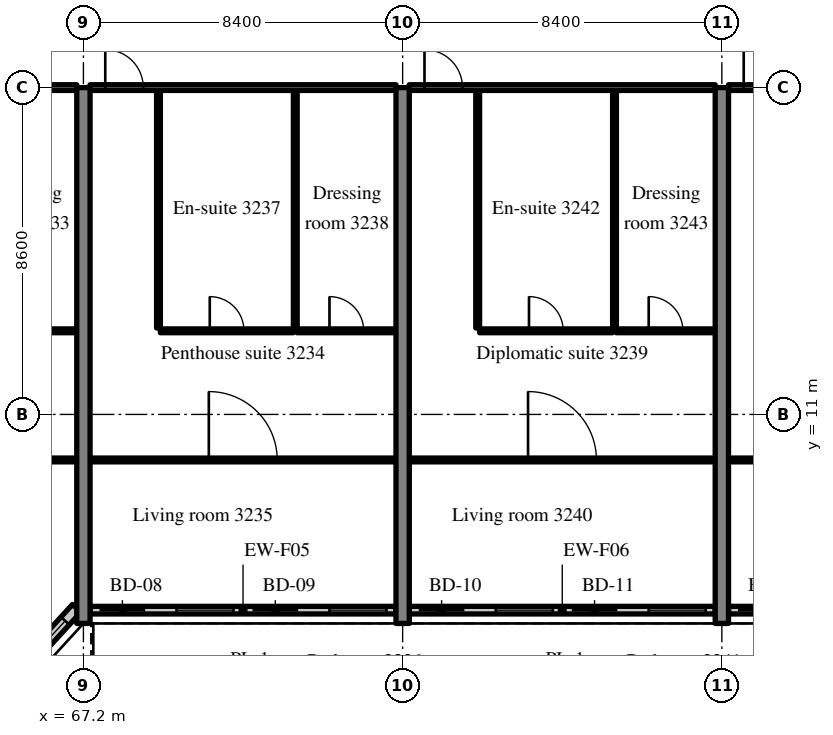
"""IFC4 building model, lengths in metres.
Left out: names, types, materials, properties, quantities, classifications, styles, units other than length and angle.
Written with IfcOpenShell. Run it as: python <this file> out.ifc"""

import sys

from ifc_helpers import new_model, si_unit, direction, frame, frame_2d, origin, place, context, subcontext, project, spatial, rectangle, extrude, source, transform, mapped, element, fill, save


model = new_model("IFC4")
c1 = context("Model", 3, precision=1e-05, world=origin(), true_north=direction((0.0, 1.0)))
c2 = subcontext(c1, "Body", "Model", "MODEL_VIEW")
j1 = project(units=[si_unit("LENGTHUNIT", "METRE"), si_unit("PLANEANGLEUNIT", "RADIAN")], contexts=[c1])
p1 = place(None, origin())
s1 = spatial("IfcSite", under=j1, at=p1, CompositionType="ELEMENT")
p2 = place(p1, origin())
s2 = spatial("IfcBuilding", under=s1, at=p2, CompositionType="ELEMENT")
p3 = place(p2, frame((0.0, 0.0, 133.2)))
s3 = spatial("IfcBuildingStorey", under=s2, at=p3, CompositionType="ELEMENT", Elevation=133.2)
m1 = source(origin(), c2, "Body", "SweptSolid", [
    extrude(rectangle(XDim=14.1, YDim=0.35, at=frame_2d((7.05, 0.0))), origin(), (0.0, 0.0, 1.0), 3.52),
])
for number, where, z_axis, x_axis in (
    (1, (67.2, 5.5, 0.0), (0.0, 0.0, 1.0), (0.0, 1.0, 0.0)),
    (2, (75.6, 5.5, 0.0), (0.0, 0.0, 1.0), (0.0, 1.0, 0.0)),
    (3, (84.0, 5.5, 0.0), (0.0, 0.0, 1.0), (0.0, 1.0, 0.0)),
):
    element("IfcWall", number, at=place(p3, frame(where, z_axis=z_axis, x_axis=x_axis)), inside=s3, PredefinedType="SHEAR", context=c2, shape_type="MappedRepresentation", body=[
        mapped(m1, transform((0.0, 0.0, 0.0), scale=1.0)),
    ])
m2 = source(origin(), c2, "Body", "SweptSolid", [
    extrude(rectangle(XDim=2.398, YDim=0.3, at=frame_2d((1.199, 0.0))), origin(), (0.0, 0.0, 1.0), 3.52),
])
p4 = place(p3, frame((65.404, 4.131, 0.0), z_axis=(0.0, 0.0, 1.0), x_axis=(0.675374189419, 0.737475222815, 0.0)))
e4 = element("IfcWall", 4, at=p4, inside=s3, PredefinedType="SOLIDWALL", context=c2, shape_type="MappedRepresentation", body=[
    mapped(m2, transform((0.0, 0.0, 0.0), scale=1.0)),
])
m3 = source(origin(), c2, "Body", "SweptSolid", [
    extrude(rectangle(XDim=1.5, YDim=2.0, at=frame_2d((0.75, 1.0))), frame((0.0, 0.16, 0.0), z_axis=(0.0, -1.0, 0.0), x_axis=(1.0, 0.0, 0.0)), (0.0, 0.0, 1.0), 0.32),
])
p5 = place(p4, frame((0.449, 0.0, 0.9)))
e5 = element("IfcOpeningElement", 5, at=p5, cuts=e4, PredefinedType="OPENING", context=c2, shape_type="MappedRepresentation", body=[
    mapped(m3, transform((0.0, 0.0, 0.0), scale=1.0)),
])
m4 = source(origin(), c2, "Body", "SweptSolid", [
    extrude(rectangle(XDim=8.05, YDim=0.2, at=frame_2d((4.025, 0.0))), origin(), (0.0, 0.0, 1.0), 2.82),
])
p6 = place(p3, frame((67.375, 5.85, 0.0), z_axis=(0.0, 0.0, 1.0), x_axis=(1.0, 0.0, 0.0)))
e6 = element("IfcWall", 6, at=p6, inside=s3, PredefinedType="SOLIDWALL", context=c2, shape_type="MappedRepresentation", body=[
    mapped(m4, transform((0.0, 0.0, 0.0), scale=1.0)),
])
m5 = source(origin(), c2, "Body", "SweptSolid", [
    extrude(rectangle(XDim=1.2, YDim=2.4, at=frame_2d((0.6, 1.2))), frame((0.0, 0.11, 0.0), z_axis=(0.0, -1.0, 0.0), x_axis=(1.0, 0.0, 0.0)), (0.0, 0.0, 1.0), 0.22),
])
p7 = place(p6, frame((0.25, 0.0, 0.0)))
e7 = element("IfcOpeningElement", 7, at=p7, cuts=e6, PredefinedType="OPENING", context=c2, shape_type="MappedRepresentation", body=[
    mapped(m5, transform((0.0, 0.0, 0.0), scale=1.0)),
])
m6 = source(origin(), c2, "Body", "SweptSolid", [
    extrude(rectangle(XDim=1.5, YDim=1.5, at=frame_2d((0.75, 0.75))), frame((0.0, 0.11, 0.0), z_axis=(0.0, -1.0, 0.0), x_axis=(1.0, 0.0, 0.0)), (0.0, 0.0, 1.0), 0.22),
])
p8 = place(p6, frame((2.275, 0.0, 0.9)))
e8 = element("IfcOpeningElement", 8, at=p8, cuts=e6, PredefinedType="OPENING", context=c2, shape_type="MappedRepresentation", body=[
    mapped(m6, transform((0.0, 0.0, 0.0), scale=1.0)),
])
p9 = place(p6, frame((4.275, 0.0, 0.0)))
e9 = element("IfcOpeningElement", 9, at=p9, cuts=e6, PredefinedType="OPENING", context=c2, shape_type="MappedRepresentation", body=[
    mapped(m5, transform((0.0, 0.0, 0.0), scale=1.0)),
])
p10 = place(p6, frame((6.3, 0.0, 0.9)))
e10 = element("IfcOpeningElement", 10, at=p10, cuts=e6, PredefinedType="OPENING", context=c2, shape_type="MappedRepresentation", body=[
    mapped(m6, transform((0.0, 0.0, 0.0), scale=1.0)),
])
p11 = place(p3, frame((75.775, 5.85, 0.0), z_axis=(0.0, 0.0, 1.0), x_axis=(1.0, 0.0, 0.0)))
e11 = element("IfcWall", 11, at=p11, inside=s3, PredefinedType="SOLIDWALL", context=c2, shape_type="MappedRepresentation", body=[
    mapped(m4, transform((0.0, 0.0, 0.0), scale=1.0)),
])
p12 = place(p11, frame((0.25, 0.0, 0.0)))
e12 = element("IfcOpeningElement", 12, at=p12, cuts=e11, PredefinedType="OPENING", context=c2, shape_type="MappedRepresentation", body=[
    mapped(m5, transform((0.0, 0.0, 0.0), scale=1.0)),
])
p13 = place(p11, frame((2.275, 0.0, 0.9)))
e13 = element("IfcOpeningElement", 13, at=p13, cuts=e11, PredefinedType="OPENING", context=c2, shape_type="MappedRepresentation", body=[
    mapped(m6, transform((0.0, 0.0, 0.0), scale=1.0)),
])
p14 = place(p11, frame((4.275, 0.0, 0.0)))
e14 = element("IfcOpeningElement", 14, at=p14, cuts=e11, PredefinedType="OPENING", context=c2, shape_type="MappedRepresentation", body=[
    mapped(m5, transform((0.0, 0.0, 0.0), scale=1.0)),
])
p15 = place(p11, frame((6.3, 0.0, 0.9)))
e15 = element("IfcOpeningElement", 15, at=p15, cuts=e11, PredefinedType="OPENING", context=c2, shape_type="MappedRepresentation", body=[
    mapped(m6, transform((0.0, 0.0, 0.0), scale=1.0)),
])
p16 = place(p3, frame((84.175, 5.85, 0.0), z_axis=(0.0, 0.0, 1.0), x_axis=(1.0, 0.0, 0.0)))
e16 = element("IfcWall", 16, at=p16, inside=s3, PredefinedType="SOLIDWALL", context=c2, shape_type="MappedRepresentation", body=[
    mapped(m4, transform((0.0, 0.0, 0.0), scale=1.0)),
])
p17 = place(p16, frame((0.25, 0.0, 0.0)))
e17 = element("IfcOpeningElement", 17, at=p17, cuts=e16, PredefinedType="OPENING", context=c2, shape_type="MappedRepresentation", body=[
    mapped(m5, transform((0.0, 0.0, 0.0), scale=1.0)),
])
p18 = place(p16, frame((2.275, 0.0, 0.9)))
e18 = element("IfcOpeningElement", 18, at=p18, cuts=e16, PredefinedType="OPENING", context=c2, shape_type="MappedRepresentation", body=[
    mapped(m6, transform((0.0, 0.0, 0.0), scale=1.0)),
])
p19 = place(p16, frame((4.275, 0.0, 0.0)))
e19 = element("IfcOpeningElement", 19, at=p19, cuts=e16, PredefinedType="OPENING", context=c2, shape_type="MappedRepresentation", body=[
    mapped(m5, transform((0.0, 0.0, 0.0), scale=1.0)),
])
p20 = place(p16, frame((6.3, 0.0, 0.9)))
e20 = element("IfcOpeningElement", 20, at=p20, cuts=e16, PredefinedType="OPENING", context=c2, shape_type="MappedRepresentation", body=[
    mapped(m6, transform((0.0, 0.0, 0.0), scale=1.0)),
])
m7 = source(origin(), c2, "Body", "SweptSolid", [
    extrude(rectangle(XDim=2.6, YDim=0.1, at=frame_2d((1.3, 0.0))), origin(), (0.0, 0.0, 1.0), 3.52),
])
p21 = place(p3, frame((64.425, 13.2, 0.0), z_axis=(0.0, 0.0, 1.0), x_axis=(1.0, 0.0, 0.0)))
e21 = element("IfcWall", 21, at=p21, inside=s3, PredefinedType="PARTITIONING", context=c2, shape_type="MappedRepresentation", body=[
    mapped(m7, transform((0.0, 0.0, 0.0), scale=1.0)),
])
m8 = source(origin(), c2, "Body", "SweptSolid", [
    extrude(rectangle(XDim=0.9, YDim=2.1, at=frame_2d((0.45, 1.05))), frame((0.0, 0.06, 0.0), z_axis=(0.0, -1.0, 0.0), x_axis=(1.0, 0.0, 0.0)), (0.0, 0.0, 1.0), 0.12),
])
p22 = place(p21, frame((0.85, 0.0, 0.0)))
e22 = element("IfcOpeningElement", 22, at=p22, cuts=e21, PredefinedType="OPENING", context=c2, shape_type="MappedRepresentation", body=[
    mapped(m8, transform((0.0, 0.0, 0.0), scale=1.0)),
])
m9 = source(origin(), c2, "Body", "SweptSolid", [
    extrude(rectangle(XDim=8.05, YDim=0.1, at=frame_2d((4.025, 0.0))), origin(), (0.0, 0.0, 1.0), 3.52),
])
p23 = place(p3, frame((58.975, 9.802, 0.0), z_axis=(0.0, 0.0, 1.0), x_axis=(1.0, 0.0, 0.0)))
e23 = element("IfcWall", 23, at=p23, inside=s3, PredefinedType="PARTITIONING", context=c2, shape_type="MappedRepresentation", body=[
    mapped(m9, transform((0.0, 0.0, 0.0), scale=1.0)),
])
m10 = source(origin(), c2, "Body", "SweptSolid", [
    extrude(rectangle(XDim=1.8, YDim=2.1, at=frame_2d((0.9, 1.05))), frame((0.0, 0.06, 0.0), z_axis=(0.0, -1.0, 0.0), x_axis=(1.0, 0.0, 0.0)), (0.0, 0.0, 1.0), 0.12),
])
p24 = place(p23, frame((3.125, 0.0, 0.0)))
e24 = element("IfcOpeningElement", 24, at=p24, cuts=e23, PredefinedType="OPENING", context=c2, shape_type="MappedRepresentation", body=[
    mapped(m10, transform((0.0, 0.0, 0.0), scale=1.0)),
])
m11 = source(origin(), c2, "Body", "SweptSolid", [
    extrude(rectangle(XDim=8.05, YDim=0.15, at=frame_2d((4.025, 0.0))), origin(), (0.0, 0.0, 1.0), 2.82),
])
p25 = place(p3, frame((58.975, 19.6, 0.0), z_axis=(0.0, 0.0, 1.0), x_axis=(1.0, 0.0, 0.0)))
e25 = element("IfcWall", 25, at=p25, inside=s3, PredefinedType="PARTITIONING", context=c2, shape_type="MappedRepresentation", body=[
    mapped(m11, transform((0.0, 0.0, 0.0), scale=1.0)),
])
m12 = source(origin(), c2, "Body", "SweptSolid", [
    extrude(rectangle(XDim=1.0, YDim=2.1, at=frame_2d((0.5, 1.05))), frame((0.0, 0.085, 0.0), z_axis=(0.0, -1.0, 0.0), x_axis=(1.0, 0.0, 0.0)), (0.0, 0.0, 1.0), 0.17),
])
p26 = place(p25, frame((0.4, 0.0, 0.0)))
e26 = element("IfcOpeningElement", 26, at=p26, cuts=e25, PredefinedType="OPENING", context=c2, shape_type="MappedRepresentation", body=[
    mapped(m12, transform((0.0, 0.0, 0.0), scale=1.0)),
])
m13 = source(origin(), c2, "Body", "SweptSolid", [
    extrude(rectangle(XDim=6.25, YDim=0.1, at=frame_2d((3.125, 0.0))), origin(), (0.0, 0.0, 1.0), 3.52),
])
for number, where, z_axis, x_axis in (
    (27, (69.175, 13.275, 0.0), (0.0, 0.0, 1.0), (0.0, 1.0, 0.0)),
    (28, (72.775, 13.275, 0.0), (0.0, 0.0, 1.0), (0.0, 1.0, 0.0)),
):
    element("IfcWall", number, at=place(p3, frame(where, z_axis=z_axis, x_axis=x_axis)), inside=s3, PredefinedType="PARTITIONING", context=c2, shape_type="MappedRepresentation", body=[
        mapped(m13, transform((0.0, 0.0, 0.0), scale=1.0)),
    ])
m14 = source(origin(), c2, "Body", "SweptSolid", [
    extrude(rectangle(XDim=3.5, YDim=0.1, at=frame_2d((1.75, 0.0))), origin(), (0.0, 0.0, 1.0), 3.52),
])
p27 = place(p3, frame((69.225, 13.2, 0.0), z_axis=(0.0, 0.0, 1.0), x_axis=(1.0, 0.0, 0.0)))
e29 = element("IfcWall", 29, at=p27, inside=s3, PredefinedType="PARTITIONING", context=c2, shape_type="MappedRepresentation", body=[
    mapped(m14, transform((0.0, 0.0, 0.0), scale=1.0)),
])
p28 = place(p27, frame((1.3, 0.0, 0.0)))
e30 = element("IfcOpeningElement", 30, at=p28, cuts=e29, PredefinedType="OPENING", context=c2, shape_type="MappedRepresentation", body=[
    mapped(m8, transform((0.0, 0.0, 0.0), scale=1.0)),
])
m15 = source(origin(), c2, "Body", "SweptSolid", [
    extrude(rectangle(XDim=2.6, YDim=0.1, at=frame_2d((1.3, 0.0))), origin(), (0.0, 0.0, 1.0), 3.52),
])
p29 = place(p3, frame((72.825, 13.2, 0.0), z_axis=(0.0, 0.0, 1.0), x_axis=(1.0, 0.0, 0.0)))
e31 = element("IfcWall", 31, at=p29, inside=s3, PredefinedType="PARTITIONING", context=c2, shape_type="MappedRepresentation", body=[
    mapped(m15, transform((0.0, 0.0, 0.0), scale=1.0)),
])
p30 = place(p29, frame((0.85, 0.0, 0.0)))
e32 = element("IfcOpeningElement", 32, at=p30, cuts=e31, PredefinedType="OPENING", context=c2, shape_type="MappedRepresentation", body=[
    mapped(m8, transform((0.0, 0.0, 0.0), scale=1.0)),
])
m16 = source(origin(), c2, "Body", "SweptSolid", [
    extrude(rectangle(XDim=8.05, YDim=0.1, at=frame_2d((4.025, 0.0))), origin(), (0.0, 0.0, 1.0), 3.52),
])
p31 = place(p3, frame((67.375, 9.802, 0.0), z_axis=(0.0, 0.0, 1.0), x_axis=(1.0, 0.0, 0.0)))
e33 = element("IfcWall", 33, at=p31, inside=s3, PredefinedType="PARTITIONING", context=c2, shape_type="MappedRepresentation", body=[
    mapped(m16, transform((0.0, 0.0, 0.0), scale=1.0)),
])
p32 = place(p31, frame((3.125, 0.0, 0.0)))
e34 = element("IfcOpeningElement", 34, at=p32, cuts=e33, PredefinedType="OPENING", context=c2, shape_type="MappedRepresentation", body=[
    mapped(m10, transform((0.0, 0.0, 0.0), scale=1.0)),
])
m17 = source(origin(), c2, "Body", "SweptSolid", [
    extrude(rectangle(XDim=8.05, YDim=0.15, at=frame_2d((4.025, 0.0))), origin(), (0.0, 0.0, 1.0), 2.82),
])
p33 = place(p3, frame((67.375, 19.6, 0.0), z_axis=(0.0, 0.0, 1.0), x_axis=(1.0, 0.0, 0.0)))
e35 = element("IfcWall", 35, at=p33, inside=s3, PredefinedType="PARTITIONING", context=c2, shape_type="MappedRepresentation", body=[
    mapped(m17, transform((0.0, 0.0, 0.0), scale=1.0)),
])
p34 = place(p33, frame((0.4, 0.0, 0.0)))
e36 = element("IfcOpeningElement", 36, at=p34, cuts=e35, PredefinedType="OPENING", context=c2, shape_type="MappedRepresentation", body=[
    mapped(m12, transform((0.0, 0.0, 0.0), scale=1.0)),
])
for number, where, z_axis, x_axis in (
    (37, (77.575, 13.275, 0.0), (0.0, 0.0, 1.0), (0.0, 1.0, 0.0)),
    (38, (81.175, 13.275, 0.0), (0.0, 0.0, 1.0), (0.0, 1.0, 0.0)),
):
    element("IfcWall", number, at=place(p3, frame(where, z_axis=z_axis, x_axis=x_axis)), inside=s3, PredefinedType="PARTITIONING", context=c2, shape_type="MappedRepresentation", body=[
        mapped(m13, transform((0.0, 0.0, 0.0), scale=1.0)),
    ])
p35 = place(p3, frame((77.625, 13.2, 0.0), z_axis=(0.0, 0.0, 1.0), x_axis=(1.0, 0.0, 0.0)))
e39 = element("IfcWall", 39, at=p35, inside=s3, PredefinedType="PARTITIONING", context=c2, shape_type="MappedRepresentation", body=[
    mapped(m14, transform((0.0, 0.0, 0.0), scale=1.0)),
])
p36 = place(p35, frame((1.3, 0.0, 0.0)))
e40 = element("IfcOpeningElement", 40, at=p36, cuts=e39, PredefinedType="OPENING", context=c2, shape_type="MappedRepresentation", body=[
    mapped(m8, transform((0.0, 0.0, 0.0), scale=1.0)),
])
p37 = place(p3, frame((81.225, 13.2, 0.0), z_axis=(0.0, 0.0, 1.0), x_axis=(1.0, 0.0, 0.0)))
e41 = element("IfcWall", 41, at=p37, inside=s3, PredefinedType="PARTITIONING", context=c2, shape_type="MappedRepresentation", body=[
    mapped(m7, transform((0.0, 0.0, 0.0), scale=1.0)),
])
p38 = place(p37, frame((0.85, 0.0, 0.0)))
e42 = element("IfcOpeningElement", 42, at=p38, cuts=e41, PredefinedType="OPENING", context=c2, shape_type="MappedRepresentation", body=[
    mapped(m8, transform((0.0, 0.0, 0.0), scale=1.0)),
])
p39 = place(p3, frame((75.775, 9.802, 0.0), z_axis=(0.0, 0.0, 1.0), x_axis=(1.0, 0.0, 0.0)))
e43 = element("IfcWall", 43, at=p39, inside=s3, PredefinedType="PARTITIONING", context=c2, shape_type="MappedRepresentation", body=[
    mapped(m16, transform((0.0, 0.0, 0.0), scale=1.0)),
])
p40 = place(p39, frame((3.125, 0.0, 0.0)))
e44 = element("IfcOpeningElement", 44, at=p40, cuts=e43, PredefinedType="OPENING", context=c2, shape_type="MappedRepresentation", body=[
    mapped(m10, transform((0.0, 0.0, 0.0), scale=1.0)),
])
p41 = place(p3, frame((75.775, 19.6, 0.0), z_axis=(0.0, 0.0, 1.0), x_axis=(1.0, 0.0, 0.0)))
e45 = element("IfcWall", 45, at=p41, inside=s3, PredefinedType="PARTITIONING", context=c2, shape_type="MappedRepresentation", body=[
    mapped(m17, transform((0.0, 0.0, 0.0), scale=1.0)),
])
p42 = place(p41, frame((0.4, 0.0, 0.0)))
e46 = element("IfcOpeningElement", 46, at=p42, cuts=e45, PredefinedType="OPENING", context=c2, shape_type="MappedRepresentation", body=[
    mapped(m12, transform((0.0, 0.0, 0.0), scale=1.0)),
])
p43 = place(p3, frame((84.175, 9.802, 0.0), z_axis=(0.0, 0.0, 1.0), x_axis=(1.0, 0.0, 0.0)))
e47 = element("IfcWall", 47, at=p43, inside=s3, PredefinedType="PARTITIONING", context=c2, shape_type="MappedRepresentation", body=[
    mapped(m16, transform((0.0, 0.0, 0.0), scale=1.0)),
])
p44 = place(p43, frame((3.125, 0.0, 0.0)))
e48 = element("IfcOpeningElement", 48, at=p44, cuts=e47, PredefinedType="OPENING", context=c2, shape_type="MappedRepresentation", body=[
    mapped(m10, transform((0.0, 0.0, 0.0), scale=1.0)),
])
p45 = place(p3, frame((84.175, 19.6, 0.0), z_axis=(0.0, 0.0, 1.0), x_axis=(1.0, 0.0, 0.0)))
e49 = element("IfcWall", 49, at=p45, inside=s3, PredefinedType="PARTITIONING", context=c2, shape_type="MappedRepresentation", body=[
    mapped(m17, transform((0.0, 0.0, 0.0), scale=1.0)),
])
p46 = place(p45, frame((0.4, 0.0, 0.0)))
e50 = element("IfcOpeningElement", 50, at=p46, cuts=e49, PredefinedType="OPENING", context=c2, shape_type="MappedRepresentation", body=[
    mapped(m12, transform((0.0, 0.0, 0.0), scale=1.0)),
])
m18 = source(origin(), c2, "Body", "SweptSolid", [
    extrude(rectangle(XDim=1.5, YDim=2.0, at=frame_2d((0.75, 1.0))), frame((0.0, 0.03, 0.0), z_axis=(0.0, -1.0, 0.0), x_axis=(1.0, 0.0, 0.0)), (0.0, 0.0, 1.0), 0.06),
])
p47 = place(p5, origin())
e51 = element("IfcWindow", 51, at=p47, inside=s3, PartitioningType="SINGLE_PANEL", PredefinedType="WINDOW", context=c2, shape_type="MappedRepresentation", body=[
    mapped(m18, transform((0.0, 0.0, 0.0), scale=1.0)),
])
fill(e5, e51)
m19 = source(origin(), c2, "Body", "SweptSolid", [
    extrude(rectangle(XDim=1.2, YDim=2.4, at=frame_2d((0.6, 1.2))), frame((0.0, 0.025, 0.0), z_axis=(0.0, -1.0, 0.0), x_axis=(1.0, 0.0, 0.0)), (0.0, 0.0, 1.0), 0.05),
])
p48 = place(p7, origin())
e52 = element("IfcDoor", 52, at=p48, inside=s3, OperationType="SLIDING_TO_RIGHT", PredefinedType="DOOR", context=c2, shape_type="MappedRepresentation", body=[
    mapped(m19, transform((0.0, 0.0, 0.0), scale=1.0)),
])
fill(e7, e52)
m20 = source(origin(), c2, "Body", "SweptSolid", [
    extrude(rectangle(XDim=1.5, YDim=1.5, at=frame_2d((0.75, 0.75))), frame((0.0, 0.03, 0.0), z_axis=(0.0, -1.0, 0.0), x_axis=(1.0, 0.0, 0.0)), (0.0, 0.0, 1.0), 0.06),
])
p49 = place(p8, origin())
e53 = element("IfcWindow", 53, at=p49, inside=s3, PartitioningType="SINGLE_PANEL", PredefinedType="WINDOW", context=c2, shape_type="MappedRepresentation", body=[
    mapped(m20, transform((0.0, 0.0, 0.0), scale=1.0)),
])
fill(e8, e53)
p50 = place(p9, origin())
e54 = element("IfcDoor", 54, at=p50, inside=s3, OperationType="SLIDING_TO_LEFT", PredefinedType="DOOR", context=c2, shape_type="MappedRepresentation", body=[
    mapped(m19, transform((0.0, 0.0, 0.0), scale=1.0)),
])
fill(e9, e54)
p51 = place(p10, origin())
e55 = element("IfcWindow", 55, at=p51, inside=s3, PartitioningType="SINGLE_PANEL", PredefinedType="WINDOW", context=c2, shape_type="MappedRepresentation", body=[
    mapped(m20, transform((0.0, 0.0, 0.0), scale=1.0)),
])
fill(e10, e55)
p52 = place(p12, origin())
e56 = element("IfcDoor", 56, at=p52, inside=s3, OperationType="SLIDING_TO_RIGHT", PredefinedType="DOOR", context=c2, shape_type="MappedRepresentation", body=[
    mapped(m19, transform((0.0, 0.0, 0.0), scale=1.0)),
])
fill(e12, e56)
p53 = place(p13, origin())
e57 = element("IfcWindow", 57, at=p53, inside=s3, PartitioningType="SINGLE_PANEL", PredefinedType="WINDOW", context=c2, shape_type="MappedRepresentation", body=[
    mapped(m20, transform((0.0, 0.0, 0.0), scale=1.0)),
])
fill(e13, e57)
p54 = place(p14, origin())
e58 = element("IfcDoor", 58, at=p54, inside=s3, OperationType="SLIDING_TO_LEFT", PredefinedType="DOOR", context=c2, shape_type="MappedRepresentation", body=[
    mapped(m19, transform((0.0, 0.0, 0.0), scale=1.0)),
])
fill(e14, e58)
p55 = place(p15, origin())
e59 = element("IfcWindow", 59, at=p55, inside=s3, PartitioningType="SINGLE_PANEL", PredefinedType="WINDOW", context=c2, shape_type="MappedRepresentation", body=[
    mapped(m20, transform((0.0, 0.0, 0.0), scale=1.0)),
])
fill(e15, e59)
p56 = place(p17, origin())
e60 = element("IfcDoor", 60, at=p56, inside=s3, OperationType="SLIDING_TO_RIGHT", PredefinedType="DOOR", context=c2, shape_type="MappedRepresentation", body=[
    mapped(m19, transform((0.0, 0.0, 0.0), scale=1.0)),
])
fill(e17, e60)
m21 = source(origin(), c2, "Body", "SweptSolid", [
    extrude(rectangle(XDim=0.9, YDim=2.1, at=frame_2d((0.45, 1.05))), frame((0.0, 0.025, 0.0), z_axis=(0.0, -1.0, 0.0), x_axis=(1.0, 0.0, 0.0)), (0.0, 0.0, 1.0), 0.05),
])
p57 = place(p28, origin())
e61 = element("IfcDoor", 61, at=p57, inside=s3, OperationType="SINGLE_SWING_LEFT", PredefinedType="DOOR", context=c2, shape_type="MappedRepresentation", body=[
    mapped(m21, transform((0.0, 0.0, 0.0), scale=1.0)),
])
fill(e30, e61)
p58 = place(p30, origin())
e62 = element("IfcDoor", 62, at=p58, inside=s3, OperationType="SINGLE_SWING_LEFT", PredefinedType="DOOR", context=c2, shape_type="MappedRepresentation", body=[
    mapped(m21, transform((0.0, 0.0, 0.0), scale=1.0)),
])
fill(e32, e62)
m22 = source(origin(), c2, "Body", "SweptSolid", [
    extrude(rectangle(XDim=1.8, YDim=2.1, at=frame_2d((0.9, 1.05))), frame((0.0, 0.025, 0.0), z_axis=(0.0, -1.0, 0.0), x_axis=(1.0, 0.0, 0.0)), (0.0, 0.0, 1.0), 0.05),
])
p59 = place(p32, origin())
e63 = element("IfcDoor", 63, at=p59, inside=s3, OperationType="DOUBLE_DOOR_SINGLE_SWING", PredefinedType="DOOR", context=c2, shape_type="MappedRepresentation", body=[
    mapped(m22, transform((0.0, 0.0, 0.0), scale=1.0)),
])
fill(e34, e63)
m23 = source(origin(), c2, "Body", "SweptSolid", [
    extrude(rectangle(XDim=1.0, YDim=2.1, at=frame_2d((0.5, 1.05))), frame((0.0, 0.025, 0.0), z_axis=(0.0, -1.0, 0.0), x_axis=(1.0, 0.0, 0.0)), (0.0, 0.0, 1.0), 0.05),
])
p60 = place(p34, origin())
e64 = element("IfcDoor", 64, at=p60, inside=s3, OperationType="SINGLE_SWING_LEFT", PredefinedType="DOOR", context=c2, shape_type="MappedRepresentation", body=[
    mapped(m23, transform((0.0, 0.0, 0.0), scale=1.0)),
])
fill(e36, e64)
p61 = place(p36, origin())
e65 = element("IfcDoor", 65, at=p61, inside=s3, OperationType="SINGLE_SWING_LEFT", PredefinedType="DOOR", context=c2, shape_type="MappedRepresentation", body=[
    mapped(m21, transform((0.0, 0.0, 0.0), scale=1.0)),
])
fill(e40, e65)
p62 = place(p38, origin())
e66 = element("IfcDoor", 66, at=p62, inside=s3, OperationType="SINGLE_SWING_LEFT", PredefinedType="DOOR", context=c2, shape_type="MappedRepresentation", body=[
    mapped(m21, transform((0.0, 0.0, 0.0), scale=1.0)),
])
fill(e42, e66)
p63 = place(p40, origin())
e67 = element("IfcDoor", 67, at=p63, inside=s3, OperationType="DOUBLE_DOOR_SINGLE_SWING", PredefinedType="DOOR", context=c2, shape_type="MappedRepresentation", body=[
    mapped(m22, transform((0.0, 0.0, 0.0), scale=1.0)),
])
fill(e44, e67)
p64 = place(p42, origin())
e68 = element("IfcDoor", 68, at=p64, inside=s3, OperationType="SINGLE_SWING_LEFT", PredefinedType="DOOR", context=c2, shape_type="MappedRepresentation", body=[
    mapped(m23, transform((0.0, 0.0, 0.0), scale=1.0)),
])
fill(e46, e68)
p65 = place(p46, origin())
e69 = element("IfcDoor", 69, at=p65, inside=s3, OperationType="SINGLE_SWING_LEFT", PredefinedType="DOOR", context=c2, shape_type="MappedRepresentation", body=[
    mapped(m23, transform((0.0, 0.0, 0.0), scale=1.0)),
])
fill(e50, e69)
save(model, sys.argv[1])
